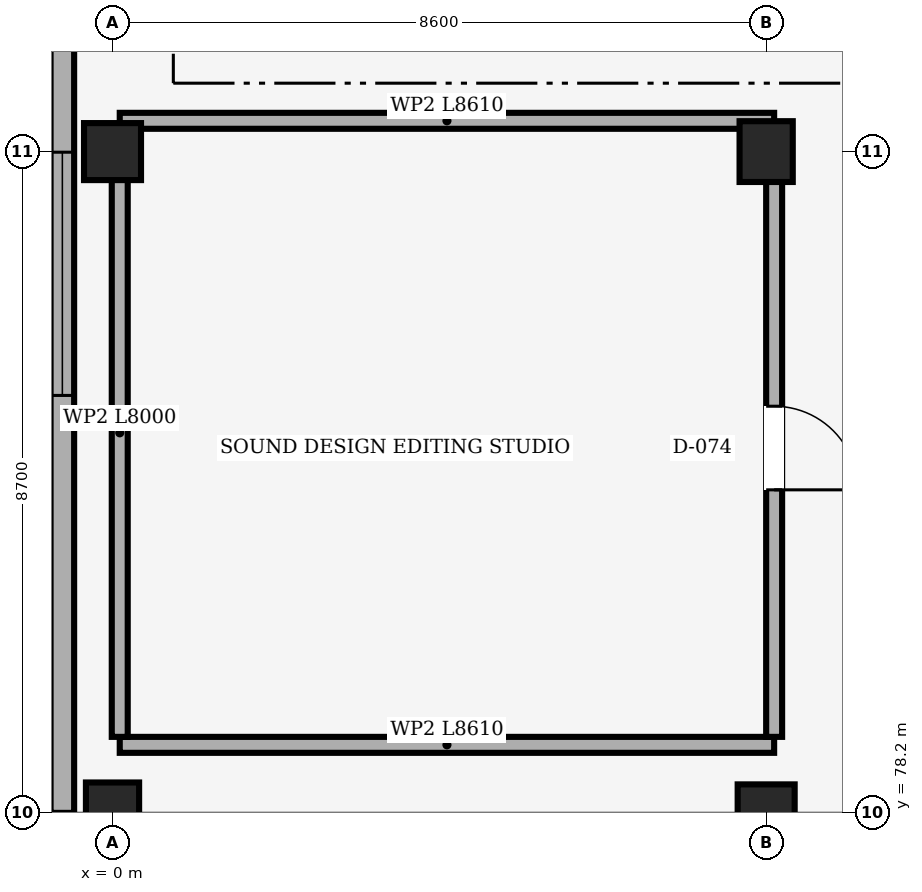
"""IFC4 building model, lengths in metres.
Left out: names, types, materials, properties, quantities, classifications, styles, units other than length and angle.
Written with IfcOpenShell. Run it as: python <this file> out.ifc"""

import sys

from ifc_helpers import new_model, si_unit, direction, frame, frame_2d, origin, origin_2d, place, context, subcontext, project, spatial, rectangle, extrude, element, fill, save


model = new_model("IFC4")
c1 = context("Model", 3, precision=1e-05, world=origin(), true_north=direction((0.0, 1.0)))
c2 = subcontext(c1, "Body", "Model", "MODEL_VIEW")
j1 = project(units=[si_unit("LENGTHUNIT", "METRE"), si_unit("PLANEANGLEUNIT", "RADIAN")], contexts=[c1])
p1 = place(None, origin())
s1 = spatial("IfcSite", under=j1, at=p1, CompositionType="ELEMENT")
p2 = place(p1, origin())
s2 = spatial("IfcBuilding", under=s1, at=p2, CompositionType="ELEMENT")
p3 = place(p2, frame((0.0, 0.0, 4.5)))
s3 = spatial("IfcBuildingStorey", under=s2, at=p3, CompositionType="ELEMENT", Elevation=4.5)
p4 = place(p3, frame((0.0, 78.2, 0.0), z_axis=(0.0, 0.0, 1.0), x_axis=(1.0, 0.0, 0.0)))
e1 = element("IfcColumn", 1, at=p4, inside=s3, PredefinedType="COLUMN", context=c2, shape_type="SweptSolid", body=[
    extrude(rectangle(XDim=0.7, YDim=0.8, at=origin_2d()), origin(), (0.0, 0.0, 1.0), 3.65),
])
for number, where, z_axis, x_axis in (
    (2, (0.0, 86.9, 0.0), (0.0, 0.0, 1.0), (1.0, 0.0, 0.0)),
    (3, (8.6, 78.2, 0.0), (0.0, 0.0, 1.0), (1.0, 0.0, 0.0)),
):
    element("IfcColumn", number, at=place(p3, frame(where, z_axis=z_axis, x_axis=x_axis)), inside=s3, PredefinedType="COLUMN", context=c2, shape_type="SweptSolid", body=[
        extrude(rectangle(XDim=0.75, YDim=0.75, at=origin_2d()), origin(), (0.0, 0.0, 1.0), 3.65),
    ])
p5 = place(p3, frame((8.6, 86.9, 0.0), z_axis=(0.0, 0.0, 1.0), x_axis=(1.0, 0.0, 0.0)))
e4 = element("IfcColumn", 4, at=p5, inside=s3, PredefinedType="COLUMN", context=c2, shape_type="SweptSolid", body=[
    extrude(rectangle(XDim=0.7, YDim=0.8, at=origin_2d()), origin(), (0.0, 0.0, 1.0), 3.65),
])
p6 = place(p3, frame((-0.66, 113.66, 0.0), z_axis=(0.0, 0.0, 1.0), x_axis=(0.0, -1.0, 0.0)))
e5 = element("IfcWall", 5, at=p6, inside=s3, PredefinedType="SOLIDWALL", context=c2, shape_type="SweptSolid", body=[
    extrude(rectangle(XDim=35.46, YDim=0.31, at=frame_2d((17.73, 0.0))), origin(), (0.0, 0.0, 1.0), 3.9),
])
p7 = place(p6, frame((5.492, 0.0, 1.55)))
e6 = element("IfcOpeningElement", 6, at=p7, cuts=e5, PredefinedType="OPENING", context=c2, shape_type="SweptSolid", body=[
    extrude(rectangle(XDim=3.2, YDim=0.7, at=frame_2d((1.6, 0.35))), frame((0.0, 0.155, 0.0), z_axis=(0.0, -1.0, 0.0), x_axis=(1.0, 0.0, 0.0)), (0.0, 0.0, 1.0), 0.31),
])
p8 = place(p6, frame((12.584, 0.0, 1.55)))
e7 = element("IfcOpeningElement", 7, at=p8, cuts=e5, PredefinedType="OPENING", context=c2, shape_type="SweptSolid", body=[
    extrude(rectangle(XDim=3.2, YDim=0.7, at=frame_2d((1.6, 0.35))), frame((0.0, 0.155, 0.0), z_axis=(0.0, -1.0, 0.0), x_axis=(1.0, 0.0, 0.0)), (0.0, 0.0, 1.0), 0.31),
])
p9 = place(p6, frame((19.676, 0.0, 1.55)))
e8 = element("IfcOpeningElement", 8, at=p9, cuts=e5, PredefinedType="OPENING", context=c2, shape_type="SweptSolid", body=[
    extrude(rectangle(XDim=3.2, YDim=0.7, at=frame_2d((1.6, 0.35))), frame((0.0, 0.155, 0.0), z_axis=(0.0, -1.0, 0.0), x_axis=(1.0, 0.0, 0.0)), (0.0, 0.0, 1.0), 0.31),
])
p10 = place(p6, frame((26.768, 0.0, 1.55)))
e9 = element("IfcOpeningElement", 9, at=p10, cuts=e5, PredefinedType="OPENING", context=c2, shape_type="SweptSolid", body=[
    extrude(rectangle(XDim=3.2, YDim=0.7, at=frame_2d((1.6, 0.35))), frame((0.0, 0.155, 0.0), z_axis=(0.0, -1.0, 0.0), x_axis=(1.0, 0.0, 0.0)), (0.0, 0.0, 1.0), 0.31),
])
p11 = place(p3, frame((8.705, 79.095, 0.0), z_axis=(0.0, 0.0, 1.0), x_axis=(-1.0, 0.0, 0.0)))
e10 = element("IfcWall", 10, at=p11, inside=s3, PredefinedType="PARTITIONING", context=c2, shape_type="SweptSolid", body=[
    extrude(rectangle(XDim=8.61, YDim=0.21, at=frame_2d((4.305, 0.0))), origin(), (0.0, 0.0, 1.0), 3.63),
])
p12 = place(p3, frame((0.095, 79.2, 0.0), z_axis=(0.0, 0.0, 1.0), x_axis=(0.0, 1.0, 0.0)))
e11 = element("IfcWall", 11, at=p12, inside=s3, PredefinedType="PARTITIONING", context=c2, shape_type="SweptSolid", body=[
    extrude(rectangle(XDim=8.0, YDim=0.21, at=frame_2d((4.0, 0.0))), origin(), (0.0, 0.0, 1.0), 2.88),
])
p13 = place(p3, frame((0.095, 87.305, 0.0), z_axis=(0.0, 0.0, 1.0), x_axis=(1.0, 0.0, 0.0)))
e12 = element("IfcWall", 12, at=p13, inside=s3, PredefinedType="PARTITIONING", context=c2, shape_type="SweptSolid", body=[
    extrude(rectangle(XDim=8.61, YDim=0.21, at=frame_2d((4.305, 0.0))), origin(), (0.0, 0.0, 1.0), 2.88),
])
p14 = place(p3, frame((8.705, 87.2, 0.0), z_axis=(0.0, 0.0, 1.0), x_axis=(0.0, -1.0, 0.0)))
e13 = element("IfcWall", 13, at=p14, inside=s3, PredefinedType="PARTITIONING", context=c2, shape_type="SweptSolid", body=[
    extrude(rectangle(XDim=8.0, YDim=0.21, at=frame_2d((4.0, 0.0))), origin(), (0.0, 0.0, 1.0), 2.88),
])
p15 = place(p14, frame((3.65, 0.0, 0.0)))
e14 = element("IfcOpeningElement", 14, at=p15, cuts=e13, PredefinedType="OPENING", context=c2, shape_type="SweptSolid", body=[
    extrude(rectangle(XDim=1.1, YDim=2.1, at=frame_2d((0.55, 1.05))), frame((0.0, 0.105, 0.0), z_axis=(0.0, -1.0, 0.0), x_axis=(1.0, 0.0, 0.0)), (0.0, 0.0, 1.0), 0.21),
])
p16 = place(p10, origin())
e15 = element("IfcWindow", 15, at=p16, inside=s3, PartitioningType="SINGLE_PANEL", PredefinedType="WINDOW", context=c2, shape_type="SweptSolid", body=[
    extrude(rectangle(XDim=3.2, YDim=0.7, at=frame_2d((1.6, 0.35))), frame((0.0, -0.06, 0.0), z_axis=(0.0, -1.0, 0.0), x_axis=(1.0, 0.0, 0.0)), (0.0, 0.0, 1.0), 0.06),
])
fill(e9, e15)
p17 = place(p15, origin())
e16 = element("IfcDoor", 16, at=p17, inside=s3, OperationType="SINGLE_SWING_RIGHT", PredefinedType="DOOR", context=c2, shape_type="SweptSolid", body=[
    extrude(rectangle(XDim=1.1, YDim=2.1, at=frame_2d((0.55, 1.05))), frame((0.0, 0.025, 0.0), z_axis=(0.0, -1.0, 0.0), x_axis=(1.0, 0.0, 0.0)), (0.0, 0.0, 1.0), 0.05),
])
fill(e14, e16)
save(model, sys.argv[1])
